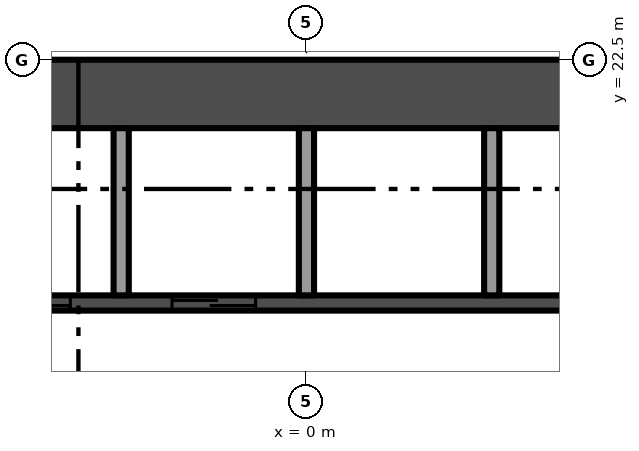
"""IFC4 building model, lengths in metres.
Left out: names, types, materials, properties, quantities, classifications, styles, units other than length and angle.
Written with IfcOpenShell. Run it as: python <this file> out.ifc"""

import sys

from ifc_helpers import new_model, si_unit, direction, frame, frame_2d, origin, place, context, subcontext, project, spatial, rectangle, extrude, element, fill, save


model = new_model("IFC4")
c1 = context("Model", 3, precision=1e-05, world=origin(), true_north=direction((0.0, 1.0)))
c2 = subcontext(c1, "Body", "Model", "MODEL_VIEW")
j1 = project(units=[si_unit("LENGTHUNIT", "METRE"), si_unit("PLANEANGLEUNIT", "RADIAN")], contexts=[c1])
p1 = place(None, origin())
s1 = spatial("IfcSite", under=j1, at=p1, CompositionType="ELEMENT")
p2 = place(p1, origin())
s2 = spatial("IfcBuilding", under=s1, at=p2, CompositionType="ELEMENT")
p3 = place(p2, frame((0.0, 0.0, 107.4)))
s3 = spatial("IfcBuildingStorey", under=s2, at=p3, CompositionType="ELEMENT", Elevation=107.4)
p4 = place(p3, frame((13.5, 22.05, -0.3), z_axis=(0.0, 0.0, 1.0), x_axis=(-1.0, 0.0, 0.0)))
e1 = element("IfcWall", 1, at=p4, inside=s3, PredefinedType="SHEAR", context=c2, shape_type="SweptSolid", body=[
    extrude(rectangle(XDim=27.0, YDim=0.9, at=frame_2d((13.5, 0.0))), origin(), (0.0, 0.0, 1.0), 3.8),
])
p5 = place(p3, frame((-9.85, 19.3, 0.0), z_axis=(0.0, 0.0, 1.0), x_axis=(1.0, 0.0, 0.0)))
e2 = element("IfcWall", 2, at=p5, inside=s3, PredefinedType="SHEAR", context=c2, shape_type="SweptSolid", body=[
    extrude(rectangle(XDim=19.7, YDim=0.2, at=frame_2d((9.85, 0.0))), origin(), (0.0, 0.0, 1.0), 3.5),
])
p6 = place(p5, frame((0.769, 0.0, 0.0)))
e3 = element("IfcOpeningElement", 3, at=p6, cuts=e2, PredefinedType="OPENING", context=c2, shape_type="SweptSolid", body=[
    extrude(rectangle(XDim=1.1, YDim=2.1, at=frame_2d((0.55, 1.05))), frame((0.0, 0.11, 0.0), z_axis=(0.0, -1.0, 0.0), x_axis=(1.0, 0.0, 0.0)), (0.0, 0.0, 1.0), 0.22),
])
p7 = place(p5, frame((3.206, 0.0, 0.0)))
e4 = element("IfcOpeningElement", 4, at=p7, cuts=e2, PredefinedType="OPENING", context=c2, shape_type="SweptSolid", body=[
    extrude(rectangle(XDim=1.1, YDim=2.1, at=frame_2d((0.55, 1.05))), frame((0.0, 0.11, 0.0), z_axis=(0.0, -1.0, 0.0), x_axis=(1.0, 0.0, 0.0)), (0.0, 0.0, 1.0), 0.22),
])
p8 = place(p5, frame((5.644, 0.0, 0.0)))
e5 = element("IfcOpeningElement", 5, at=p8, cuts=e2, PredefinedType="OPENING", context=c2, shape_type="SweptSolid", body=[
    extrude(rectangle(XDim=1.1, YDim=2.1, at=frame_2d((0.55, 1.05))), frame((0.0, 0.11, 0.0), z_axis=(0.0, -1.0, 0.0), x_axis=(1.0, 0.0, 0.0)), (0.0, 0.0, 1.0), 0.22),
])
p9 = place(p5, frame((8.081, 0.0, 0.0)))
e6 = element("IfcOpeningElement", 6, at=p9, cuts=e2, PredefinedType="OPENING", context=c2, shape_type="SweptSolid", body=[
    extrude(rectangle(XDim=1.1, YDim=2.1, at=frame_2d((0.55, 1.05))), frame((0.0, 0.11, 0.0), z_axis=(0.0, -1.0, 0.0), x_axis=(1.0, 0.0, 0.0)), (0.0, 0.0, 1.0), 0.22),
])
for number, where, z_axis, x_axis in (
    (7, (-2.438, 19.4, 0.0), (0.0, 0.0, 1.0), (0.0, 1.0, 0.0)),
    (8, (0.0, 19.4, 0.0), (0.0, 0.0, 1.0), (0.0, 1.0, 0.0)),
    (9, (2.438, 19.4, 0.0), (0.0, 0.0, 1.0), (0.0, 1.0, 0.0)),
):
    element("IfcWall", number, at=place(p3, frame(where, z_axis=z_axis, x_axis=x_axis)), inside=s3, PredefinedType="PARTITIONING", context=c2, shape_type="SweptSolid", body=[
        extrude(rectangle(XDim=2.2, YDim=0.2, at=frame_2d((1.1, 0.0))), origin(), (0.0, 0.0, 1.0), 3.5),
    ])
p10 = place(p8, origin())
e10 = element("IfcDoor", 10, at=p10, inside=s3, OperationType="SLIDING_TO_LEFT", PredefinedType="DOOR", context=c2, shape_type="SweptSolid", body=[
    extrude(rectangle(XDim=1.1, YDim=2.1, at=frame_2d((0.55, 1.05))), frame((0.0, 0.025, 0.0), z_axis=(0.0, -1.0, 0.0), x_axis=(1.0, 0.0, 0.0)), (0.0, 0.0, 1.0), 0.05),
])
fill(e5, e10)
p11 = place(p9, origin())
e11 = element("IfcDoor", 11, at=p11, inside=s3, OperationType="SLIDING_TO_LEFT", PredefinedType="DOOR", context=c2, shape_type="SweptSolid", body=[
    extrude(rectangle(XDim=1.1, YDim=2.1, at=frame_2d((0.55, 1.05))), frame((0.0, 0.025, 0.0), z_axis=(0.0, -1.0, 0.0), x_axis=(1.0, 0.0, 0.0)), (0.0, 0.0, 1.0), 0.05),
])
fill(e6, e11)
save(model, sys.argv[1])
